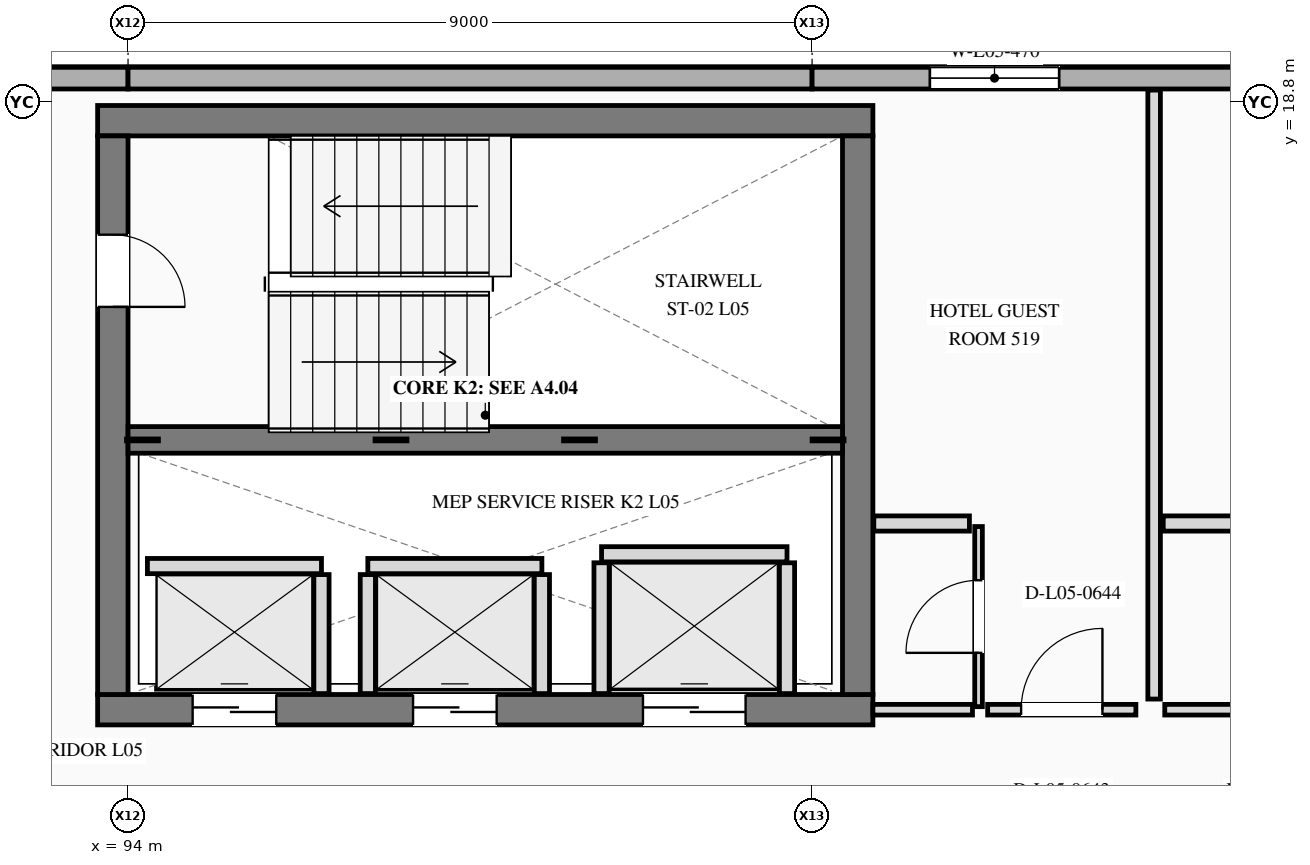
"""IFC4 building model, lengths in metres.
Left out: names, types, materials, properties, quantities, classifications, styles, units other than length and angle.
Written with IfcOpenShell. Run it as: python <this file> out.ifc"""

import sys

from ifc_helpers import new_model, si_unit, direction, frame, frame_2d, origin, place, context, subcontext, project, spatial, rectangle, extrude, element, fill, save


model = new_model("IFC4")
c1 = context("Model", 3, precision=1e-05, world=origin(), true_north=direction((0.0, 1.0)))
c2 = subcontext(c1, "Body", "Model", "MODEL_VIEW")
j1 = project(units=[si_unit("LENGTHUNIT", "METRE"), si_unit("PLANEANGLEUNIT", "RADIAN")], contexts=[c1])
p1 = place(None, origin())
s1 = spatial("IfcSite", under=j1, at=p1, CompositionType="ELEMENT")
p2 = place(p1, origin())
s2 = spatial("IfcBuilding", under=s1, at=p2, CompositionType="ELEMENT")
p3 = place(p2, frame((0.0, 0.0, 23.4)))
s3 = spatial("IfcBuildingStorey", under=s2, at=p3, CompositionType="ELEMENT", Elevation=23.4)
for number, where, z_axis, x_axis in (
    (1, (94.0, 19.11, 0.0), (0.0, 0.0, 1.0), (-1.0, 0.0, 0.0)),
    (2, (103.0, 19.11, 0.0), (0.0, 0.0, 1.0), (-1.0, 0.0, 0.0)),
):
    element("IfcWall", number, at=place(p3, frame(where, z_axis=z_axis, x_axis=x_axis)), inside=s3, PredefinedType="STANDARD", context=c2, shape_type="SweptSolid", body=[
        extrude(rectangle(XDim=9.0, YDim=0.285, at=frame_2d((4.5, 0.0))), origin(), (0.0, 0.0, 1.0), 3.6),
    ])
p4 = place(p3, frame((112.0, 19.11, 0.0), z_axis=(0.0, 0.0, 1.0), x_axis=(-1.0, 0.0, 0.0)))
e3 = element("IfcWall", 3, at=p4, inside=s3, PredefinedType="STANDARD", context=c2, shape_type="SweptSolid", body=[
    extrude(rectangle(XDim=9.0, YDim=0.285, at=frame_2d((4.5, 0.0))), origin(), (0.0, 0.0, 1.0), 3.6),
])
p5 = place(p4, frame((5.75, 0.0, 0.85)))
e4 = element("IfcOpeningElement", 4, at=p5, cuts=e3, PredefinedType="OPENING", context=c2, shape_type="SweptSolid", body=[
    extrude(rectangle(XDim=1.7, YDim=1.6, at=frame_2d((0.85, 0.8))), frame((0.0, 0.152, 0.0), z_axis=(0.0, -1.0, 0.0), x_axis=(1.0, 0.0, 0.0)), (0.0, 0.0, 1.0), 0.305),
])
p6 = place(p4, frame((1.7, 0.0, 0.85)))
e5 = element("IfcOpeningElement", 5, at=p6, cuts=e3, PredefinedType="OPENING", context=c2, shape_type="SweptSolid", body=[
    extrude(rectangle(XDim=1.4, YDim=1.55, at=frame_2d((0.7, 0.775))), frame((0.0, 0.152, 0.0), z_axis=(0.0, -1.0, 0.0), x_axis=(1.0, 0.0, 0.0)), (0.0, 0.0, 1.0), 0.305),
])
p7 = place(p3, frame((93.6, 10.8, 0.0), z_axis=(0.0, 0.0, 1.0), x_axis=(1.0, 0.0, 0.0)))
e6 = element("IfcWall", 6, at=p7, inside=s3, PredefinedType="SHEAR", context=c2, shape_type="SweptSolid", body=[
    extrude(rectangle(XDim=10.2, YDim=0.4, at=frame_2d((5.1, 0.0))), origin(), (0.0, 0.0, 1.0), 3.6),
])
p8 = place(p7, frame((1.25, 0.0, 0.0)))
e7 = element("IfcOpeningElement", 7, at=p8, cuts=e6, PredefinedType="OPENING", context=c2, shape_type="SweptSolid", body=[
    extrude(rectangle(XDim=1.1, YDim=2.2, at=frame_2d((0.55, 1.1))), frame((0.0, 0.21, 0.0), z_axis=(0.0, -1.0, 0.0), x_axis=(1.0, 0.0, 0.0)), (0.0, 0.0, 1.0), 0.42),
])
p9 = place(p7, frame((4.15, 0.0, 0.0)))
e8 = element("IfcOpeningElement", 8, at=p9, cuts=e6, PredefinedType="OPENING", context=c2, shape_type="SweptSolid", body=[
    extrude(rectangle(XDim=1.1, YDim=2.2, at=frame_2d((0.55, 1.1))), frame((0.0, 0.21, 0.0), z_axis=(0.0, -1.0, 0.0), x_axis=(1.0, 0.0, 0.0)), (0.0, 0.0, 1.0), 0.42),
])
p10 = place(p7, frame((7.175, 0.0, 0.0)))
e9 = element("IfcOpeningElement", 9, at=p10, cuts=e6, PredefinedType="OPENING", context=c2, shape_type="SweptSolid", body=[
    extrude(rectangle(XDim=1.35, YDim=2.3, at=frame_2d((0.675, 1.15))), frame((0.0, 0.21, 0.0), z_axis=(0.0, -1.0, 0.0), x_axis=(1.0, 0.0, 0.0)), (0.0, 0.0, 1.0), 0.42),
])
p11 = place(p3, frame((103.8, 18.55, 0.0), z_axis=(0.0, 0.0, 1.0), x_axis=(-1.0, 0.0, 0.0)))
e10 = element("IfcWall", 10, at=p11, inside=s3, PredefinedType="SHEAR", context=c2, shape_type="SweptSolid", body=[
    extrude(rectangle(XDim=10.2, YDim=0.4, at=frame_2d((5.1, 0.0))), origin(), (0.0, 0.0, 1.0), 3.6),
])
p12 = place(p3, frame((93.8, 18.35, 0.0), z_axis=(0.0, 0.0, 1.0), x_axis=(0.0, -1.0, 0.0)))
e11 = element("IfcWall", 11, at=p12, inside=s3, PredefinedType="SHEAR", context=c2, shape_type="SweptSolid", body=[
    extrude(rectangle(XDim=7.35, YDim=0.4, at=frame_2d((3.675, 0.0))), origin(), (0.0, 0.0, 1.0), 3.6),
])
p13 = place(p12, frame((1.3, 0.0, 0.0)))
e12 = element("IfcOpeningElement", 12, at=p13, cuts=e11, PredefinedType="OPENING", context=c2, shape_type="SweptSolid", body=[
    extrude(rectangle(XDim=0.95, YDim=2.2, at=frame_2d((0.475, 1.1))), frame((0.0, 0.21, 0.0), z_axis=(0.0, -1.0, 0.0), x_axis=(1.0, 0.0, 0.0)), (0.0, 0.0, 1.0), 0.42),
])
p14 = place(p3, frame((103.6, 11.0, 0.0), z_axis=(0.0, 0.0, 1.0), x_axis=(0.0, 1.0, 0.0)))
e13 = element("IfcWall", 13, at=p14, inside=s3, PredefinedType="SHEAR", context=c2, shape_type="SweptSolid", body=[
    extrude(rectangle(XDim=7.35, YDim=0.4, at=frame_2d((3.675, 0.0))), origin(), (0.0, 0.0, 1.0), 3.6),
])
p15 = place(p3, frame((94.0, 14.35, 0.0), z_axis=(0.0, 0.0, 1.0), x_axis=(1.0, 0.0, 0.0)))
e14 = element("IfcWall", 14, at=p15, inside=s3, PredefinedType="SHEAR", context=c2, shape_type="SweptSolid", body=[
    extrude(rectangle(XDim=9.4, YDim=0.35, at=frame_2d((4.7, 0.0))), origin(), (0.0, 0.0, 1.0), 3.6),
])
p16 = place(p3, frame((94.255, 12.69, 0.0), z_axis=(0.0, 0.0, 1.0), x_axis=(1.0, 0.0, 0.0)))
e15 = element("IfcWall", 15, at=p16, inside=s3, PredefinedType="PLUMBINGWALL", context=c2, shape_type="SweptSolid", body=[
    extrude(rectangle(XDim=2.29, YDim=0.2, at=frame_2d((1.145, 0.0))), origin(), (0.0, 0.0, 1.0), 3.3),
])
p17 = place(p3, frame((96.545, 11.012, 0.0), z_axis=(0.0, 0.0, 1.0), x_axis=(0.0, 1.0, 0.0)))
e16 = element("IfcWall", 16, at=p17, inside=s3, PredefinedType="PLUMBINGWALL", context=c2, shape_type="SweptSolid", body=[
    extrude(rectangle(XDim=1.566, YDim=0.2, at=frame_2d((0.783, 0.0))), origin(), (0.0, 0.0, 1.0), 3.3),
])
p18 = place(p3, frame((97.155, 12.69, 0.0), z_axis=(0.0, 0.0, 1.0), x_axis=(1.0, 0.0, 0.0)))
e17 = element("IfcWall", 17, at=p18, inside=s3, PredefinedType="PLUMBINGWALL", context=c2, shape_type="SweptSolid", body=[
    extrude(rectangle(XDim=2.29, YDim=0.2, at=frame_2d((1.145, 0.0))), origin(), (0.0, 0.0, 1.0), 3.3),
])
for number, where, z_axis, x_axis in (
    (18, (97.155, 11.012, 0.0), (0.0, 0.0, 1.0), (0.0, 1.0, 0.0)),
    (19, (99.445, 11.012, 0.0), (0.0, 0.0, 1.0), (0.0, 1.0, 0.0)),
):
    element("IfcWall", number, at=place(p3, frame(where, z_axis=z_axis, x_axis=x_axis)), inside=s3, PredefinedType="PLUMBINGWALL", context=c2, shape_type="SweptSolid", body=[
        extrude(rectangle(XDim=1.566, YDim=0.2, at=frame_2d((0.783, 0.0))), origin(), (0.0, 0.0, 1.0), 3.3),
    ])
p19 = place(p3, frame((100.23, 12.845, 0.0), z_axis=(0.0, 0.0, 1.0), x_axis=(1.0, 0.0, 0.0)))
e20 = element("IfcWall", 20, at=p19, inside=s3, PredefinedType="PLUMBINGWALL", context=c2, shape_type="SweptSolid", body=[
    extrude(rectangle(XDim=2.44, YDim=0.2, at=frame_2d((1.22, 0.0))), origin(), (0.0, 0.0, 1.0), 3.3),
])
for number, where, z_axis, x_axis in (
    (21, (100.23, 11.012, 0.0), (0.0, 0.0, 1.0), (0.0, 1.0, 0.0)),
    (22, (102.67, 11.012, 0.0), (0.0, 0.0, 1.0), (0.0, 1.0, 0.0)),
):
    element("IfcWall", number, at=place(p3, frame(where, z_axis=z_axis, x_axis=x_axis)), inside=s3, PredefinedType="PLUMBINGWALL", context=c2, shape_type="SweptSolid", body=[
        extrude(rectangle(XDim=1.721, YDim=0.2, at=frame_2d((0.86, 0.0))), origin(), (0.0, 0.0, 1.0), 3.3),
    ])
p20 = place(p3, frame((103.8, 10.8, 0.0), z_axis=(0.0, 0.0, 1.0), x_axis=(1.0, 0.0, 0.0)))
e23 = element("IfcWall", 23, at=p20, inside=s3, PredefinedType="PARTITIONING", context=c2, shape_type="SweptSolid", body=[
    extrude(rectangle(XDim=1.31, YDim=0.14, at=frame_2d((0.655, 0.0))), origin(), (0.0, 0.0, 1.0), 3.3),
])
p21 = place(p3, frame((105.31, 10.8, 0.0), z_axis=(0.0, 0.0, 1.0), x_axis=(1.0, 0.0, 0.0)))
e24 = element("IfcWall", 24, at=p21, inside=s3, PredefinedType="PARTITIONING", context=c2, shape_type="SweptSolid", body=[
    extrude(rectangle(XDim=1.95, YDim=0.14, at=frame_2d((0.975, 0.0))), origin(), (0.0, 0.0, 1.0), 3.3),
])
p22 = place(p21, frame((0.44, 0.0, 0.0)))
e25 = element("IfcOpeningElement", 25, at=p22, cuts=e24, PredefinedType="OPENING", context=c2, shape_type="SweptSolid", body=[
    extrude(rectangle(XDim=1.07, YDim=2.4, at=frame_2d((0.535, 1.2))), frame((0.0, 0.08, 0.0), z_axis=(0.0, -1.0, 0.0), x_axis=(1.0, 0.0, 0.0)), (0.0, 0.0, 1.0), 0.16),
])
p23 = place(p3, frame((107.5, 10.94, 0.0), z_axis=(0.0, 0.0, 1.0), x_axis=(0.0, 1.0, 0.0)))
e26 = element("IfcWall", 26, at=p23, inside=s3, PredefinedType="PARTITIONING", context=c2, shape_type="SweptSolid", body=[
    extrude(rectangle(XDim=8.012, YDim=0.165, at=frame_2d((4.006, 0.0))), origin(), (0.0, 0.0, 1.0), 3.3),
])
p24 = place(p3, frame((105.19, 10.84, 0.0), z_axis=(0.0, 0.0, 1.0), x_axis=(0.0, 1.0, 0.0)))
e27 = element("IfcWall", 27, at=p24, inside=s3, PredefinedType="PARTITIONING", context=c2, shape_type="SweptSolid", body=[
    extrude(rectangle(XDim=2.37, YDim=0.1, at=frame_2d((1.185, 0.0))), origin(), (0.0, 0.0, 1.0), 3.3),
])
p25 = place(p24, frame((0.708, 0.0, 0.0)))
e28 = element("IfcOpeningElement", 28, at=p25, cuts=e27, PredefinedType="OPENING", context=c2, shape_type="SweptSolid", body=[
    extrude(rectangle(XDim=0.955, YDim=2.22, at=frame_2d((0.478, 1.11))), frame((0.0, 0.06, 0.0), z_axis=(0.0, -1.0, 0.0), x_axis=(1.0, 0.0, 0.0)), (0.0, 0.0, 1.0), 0.12),
])
p26 = place(p3, frame((103.812, 13.25, 0.0), z_axis=(0.0, 0.0, 1.0), x_axis=(1.0, 0.0, 0.0)))
e29 = element("IfcWall", 29, at=p26, inside=s3, PredefinedType="PLUMBINGWALL", context=c2, shape_type="SweptSolid", body=[
    extrude(rectangle(XDim=1.258, YDim=0.2, at=frame_2d((0.629, 0.0))), origin(), (0.0, 0.0, 1.0), 3.3),
])
p27 = place(p3, frame((107.64, 10.8, 0.0), z_axis=(0.0, 0.0, 1.0), x_axis=(1.0, 0.0, 0.0)))
e30 = element("IfcWall", 30, at=p27, inside=s3, PredefinedType="PARTITIONING", context=c2, shape_type="SweptSolid", body=[
    extrude(rectangle(XDim=1.67, YDim=0.14, at=frame_2d((0.835, 0.0))), origin(), (0.0, 0.0, 1.0), 3.3),
])
p28 = place(p3, frame((107.62, 13.25, 0.0), z_axis=(0.0, 0.0, 1.0), x_axis=(1.0, 0.0, 0.0)))
e31 = element("IfcWall", 31, at=p28, inside=s3, PredefinedType="PLUMBINGWALL", context=c2, shape_type="SweptSolid", body=[
    extrude(rectangle(XDim=1.65, YDim=0.2, at=frame_2d((0.825, 0.0))), origin(), (0.0, 0.0, 1.0), 3.3),
])
p29 = place(p5, origin())
e32 = element("IfcWindow", 32, at=p29, inside=s3, PartitioningType="SINGLE_PANEL", PredefinedType="WINDOW", context=c2, shape_type="SweptSolid", body=[
    extrude(rectangle(XDim=1.7, YDim=1.6, at=frame_2d((0.85, 0.8))), frame((0.0, 0.03, 0.0), z_axis=(0.0, -1.0, 0.0), x_axis=(1.0, 0.0, 0.0)), (0.0, 0.0, 1.0), 0.06),
])
fill(e4, e32)
p30 = place(p13, origin())
e33 = element("IfcDoor", 33, at=p30, inside=s3, OperationType="SINGLE_SWING_RIGHT", PredefinedType="DOOR", context=c2, shape_type="SweptSolid", body=[
    extrude(rectangle(XDim=0.95, YDim=2.2, at=frame_2d((0.475, 1.1))), frame((0.0, 0.025, 0.0), z_axis=(0.0, -1.0, 0.0), x_axis=(1.0, 0.0, 0.0)), (0.0, 0.0, 1.0), 0.05),
])
fill(e12, e33)
p31 = place(p8, origin())
e34 = element("IfcDoor", 34, at=p31, inside=s3, OperationType="SLIDING_TO_LEFT", PredefinedType="DOOR", context=c2, shape_type="SweptSolid", body=[
    extrude(rectangle(XDim=1.1, YDim=2.2, at=frame_2d((0.55, 1.1))), frame((0.0, 0.025, 0.0), z_axis=(0.0, -1.0, 0.0), x_axis=(1.0, 0.0, 0.0)), (0.0, 0.0, 1.0), 0.05),
])
fill(e7, e34)
p32 = place(p9, origin())
e35 = element("IfcDoor", 35, at=p32, inside=s3, OperationType="SLIDING_TO_RIGHT", PredefinedType="DOOR", context=c2, shape_type="SweptSolid", body=[
    extrude(rectangle(XDim=1.1, YDim=2.2, at=frame_2d((0.55, 1.1))), frame((0.0, 0.025, 0.0), z_axis=(0.0, -1.0, 0.0), x_axis=(1.0, 0.0, 0.0)), (0.0, 0.0, 1.0), 0.05),
])
fill(e8, e35)
p33 = place(p10, origin())
e36 = element("IfcDoor", 36, at=p33, inside=s3, OperationType="SLIDING_TO_LEFT", PredefinedType="DOOR", context=c2, shape_type="SweptSolid", body=[
    extrude(rectangle(XDim=1.35, YDim=2.3, at=frame_2d((0.675, 1.15))), frame((0.0, 0.025, 0.0), z_axis=(0.0, -1.0, 0.0), x_axis=(1.0, 0.0, 0.0)), (0.0, 0.0, 1.0), 0.05),
])
fill(e9, e36)
p34 = place(p22, origin())
e37 = element("IfcDoor", 37, at=p34, inside=s3, OperationType="SINGLE_SWING_RIGHT", PredefinedType="DOOR", context=c2, shape_type="SweptSolid", body=[
    extrude(rectangle(XDim=1.07, YDim=2.4, at=frame_2d((0.535, 1.2))), frame((0.0, 0.025, 0.0), z_axis=(0.0, -1.0, 0.0), x_axis=(1.0, 0.0, 0.0)), (0.0, 0.0, 1.0), 0.05),
])
fill(e25, e37)
p35 = place(p25, origin())
e38 = element("IfcDoor", 38, at=p35, inside=s3, OperationType="SINGLE_SWING_LEFT", PredefinedType="DOOR", context=c2, shape_type="SweptSolid", body=[
    extrude(rectangle(XDim=0.955, YDim=2.22, at=frame_2d((0.478, 1.11))), frame((0.0, 0.025, 0.0), z_axis=(0.0, -1.0, 0.0), x_axis=(1.0, 0.0, 0.0)), (0.0, 0.0, 1.0), 0.05),
])
fill(e28, e38)
save(model, sys.argv[1])
